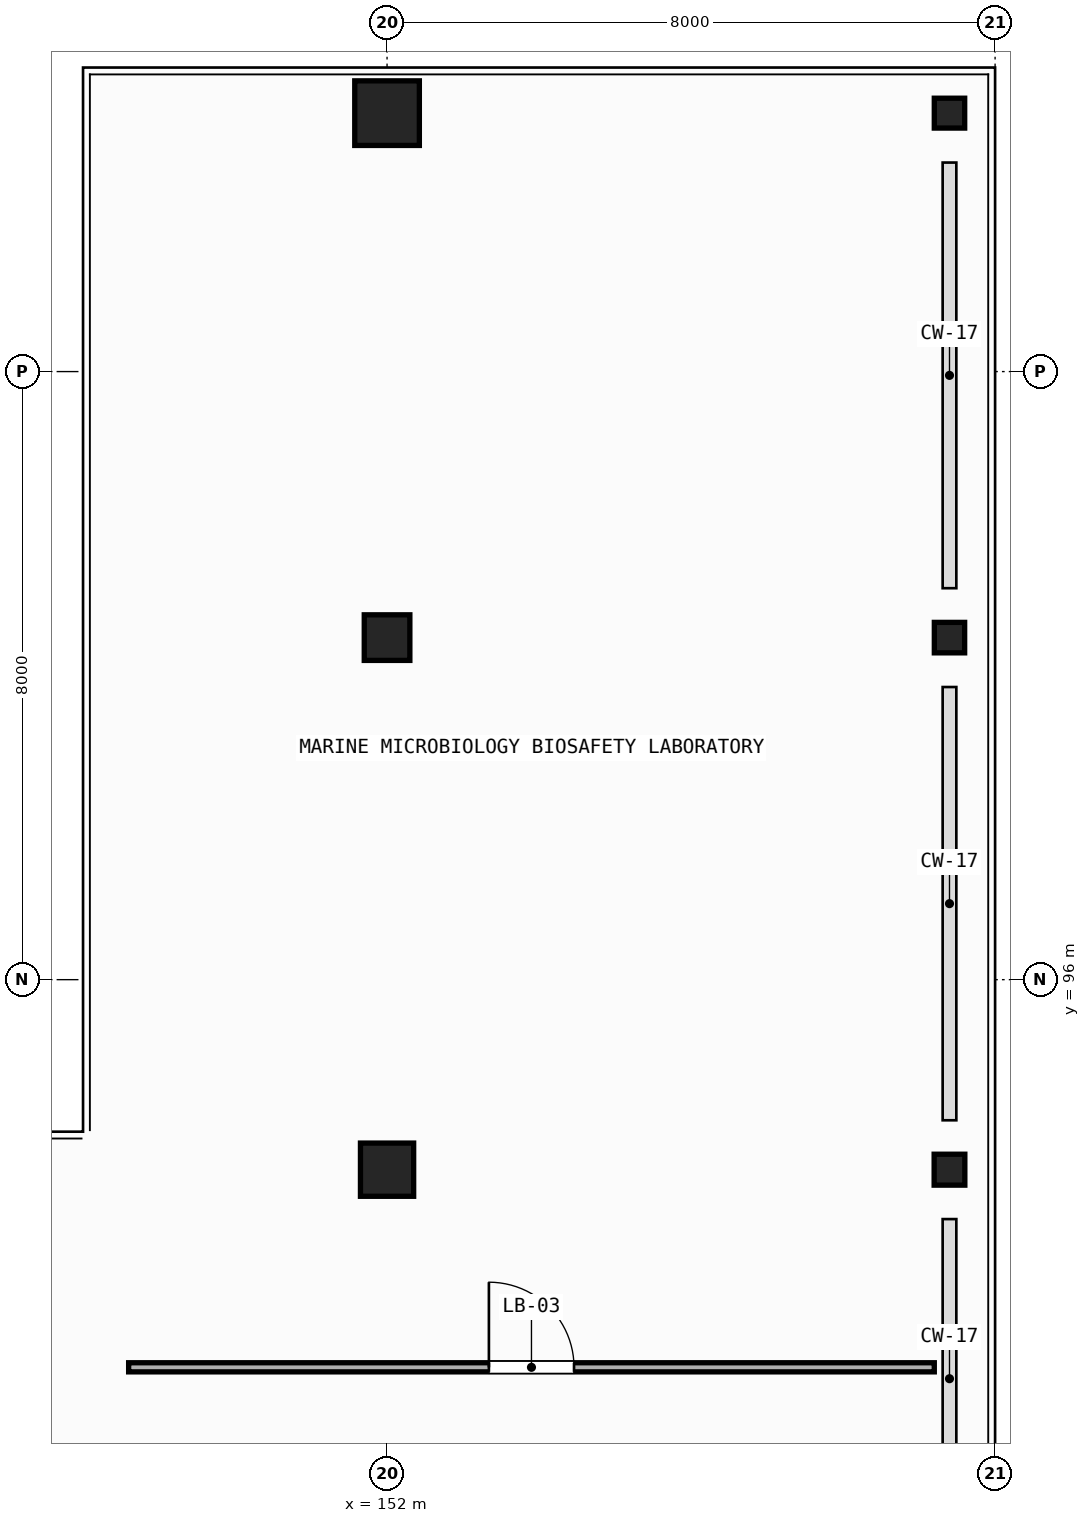
"""IFC4 building model, lengths in metres.
Left out: names, types, materials, properties, quantities, classifications, styles, units other than length and angle.
Written with IfcOpenShell. Run it as: python <this file> out.ifc"""

import sys

from ifc_helpers import new_model, si_unit, direction, frame, frame_2d, origin, origin_2d, place, context, subcontext, project, spatial, rectangle, circle, i_section, extrude, element, fill, save


model = new_model("IFC4")
c1 = context("Model", 3, precision=1e-05, world=origin(), true_north=direction((0.0, 1.0)))
c2 = subcontext(c1, "Body", "Model", "MODEL_VIEW")
j1 = project(units=[si_unit("LENGTHUNIT", "METRE"), si_unit("PLANEANGLEUNIT", "RADIAN")], contexts=[c1])
p1 = place(None, origin())
s1 = spatial("IfcSite", under=j1, at=p1, CompositionType="ELEMENT")
p2 = place(p1, origin())
s2 = spatial("IfcBuilding", under=s1, at=p2, CompositionType="ELEMENT")
p3 = place(p2, frame((0.0, 0.0, 5.4)))
s3 = spatial("IfcBuildingStorey", under=s2, at=p3, CompositionType="ELEMENT", Elevation=5.4)
p4 = place(p3, frame((152.0, 93.5, 0.0), z_axis=(0.0, 0.0, 1.0), x_axis=(0.0, 1.0, 0.0)))
e1 = element("IfcColumn", 1, at=p4, inside=s3, PredefinedType="COLUMN", context=c2, shape_type="SweptSolid", body=[
    extrude(rectangle(XDim=0.7, YDim=0.7, at=origin_2d()), origin(), (0.0, 0.0, 1.0), 4.52),
])
p5 = place(p3, frame((152.0, 100.5, 0.0), z_axis=(0.0, 0.0, 1.0), x_axis=(1.0, 0.0, 0.0)))
e2 = element("IfcColumn", 2, at=p5, inside=s3, PredefinedType="COLUMN", context=c2, shape_type="SweptSolid", body=[
    extrude(rectangle(XDim=0.6, YDim=0.6, at=origin_2d()), origin(), (0.0, 0.0, 1.0), 4.52),
])
p6 = place(p3, frame((152.0, 107.4, 0.0), z_axis=(0.0, 0.0, 1.0), x_axis=(0.0, 1.0, 0.0)))
e3 = element("IfcColumn", 3, at=p6, inside=s3, PredefinedType="COLUMN", context=c2, shape_type="SweptSolid", body=[
    extrude(circle(Radius=0.425, at=origin_2d()), origin(), (0.0, 0.0, 1.0), 4.52),
])
p7 = place(p3, frame((159.4, 93.5, 0.0), z_axis=(0.0, 0.0, 1.0), x_axis=(1.0, 0.0, 0.0)))
e4 = element("IfcColumn", 4, at=p7, inside=s3, PredefinedType="COLUMN", context=c2, shape_type="SweptSolid", body=[
    extrude(i_section(OverallWidth=0.404, OverallDepth=0.407, WebThickness=0.027, FlangeThickness=0.044, FilletRadius=0.015, at=origin_2d()), origin(), (0.0, 0.0, 1.0), 4.52),
])
p8 = place(p3, frame((159.4, 100.5, 0.0), z_axis=(0.0, 0.0, 1.0), x_axis=(0.0, 1.0, 0.0)))
e5 = element("IfcColumn", 5, at=p8, inside=s3, PredefinedType="COLUMN", context=c2, shape_type="SweptSolid", body=[
    extrude(i_section(OverallWidth=0.401, OverallDepth=0.399, WebThickness=0.025, FlangeThickness=0.04, FilletRadius=0.015, at=origin_2d()), origin(), (0.0, 0.0, 1.0), 4.52),
])
p9 = place(p3, frame((159.4, 107.4, 0.0), z_axis=(0.0, 0.0, 1.0), x_axis=(1.0, 0.0, 0.0)))
e6 = element("IfcColumn", 6, at=p9, inside=s3, PredefinedType="COLUMN", context=c2, shape_type="SweptSolid", body=[
    extrude(i_section(OverallWidth=0.4, OverallDepth=0.393, WebThickness=0.023, FlangeThickness=0.037, FilletRadius=0.015, at=origin_2d()), origin(), (0.0, 0.0, 1.0), 4.52),
])
p10 = place(p3, frame((148.6, 90.9, 0.0), z_axis=(0.0, 0.0, 1.0), x_axis=(1.0, 0.0, 0.0)))
e7 = element("IfcWall", 7, at=p10, inside=s3, PredefinedType="PARTITIONING", context=c2, shape_type="SweptSolid", body=[
    extrude(rectangle(XDim=10.6, YDim=0.12, at=frame_2d((5.3, 0.0))), origin(), (0.0, 0.0, 1.0), 3.797),
])
p11 = place(p10, frame((4.74, 0.0, 0.0)))
e8 = element("IfcOpeningElement", 8, at=p11, cuts=e7, PredefinedType="OPENING", context=c2, shape_type="SweptSolid", body=[
    extrude(rectangle(XDim=1.12, YDim=2.15, at=frame_2d((0.56, 1.075))), frame((0.0, 0.07, 0.0), z_axis=(0.0, -1.0, 0.0), x_axis=(1.0, 0.0, 0.0)), (0.0, 0.0, 1.0), 0.14),
])
p12 = place(p11, origin())
e9 = element("IfcDoor", 9, at=p12, inside=s3, OperationType="SINGLE_SWING_LEFT", PredefinedType="DOOR", context=c2, shape_type="SweptSolid", body=[
    extrude(rectangle(XDim=1.12, YDim=2.15, at=frame_2d((0.56, 1.075))), frame((0.0, 0.025, 0.0), z_axis=(0.0, -1.0, 0.0), x_axis=(1.0, 0.0, 0.0)), (0.0, 0.0, 1.0), 0.05),
])
fill(e8, e9)
save(model, sys.argv[1])
